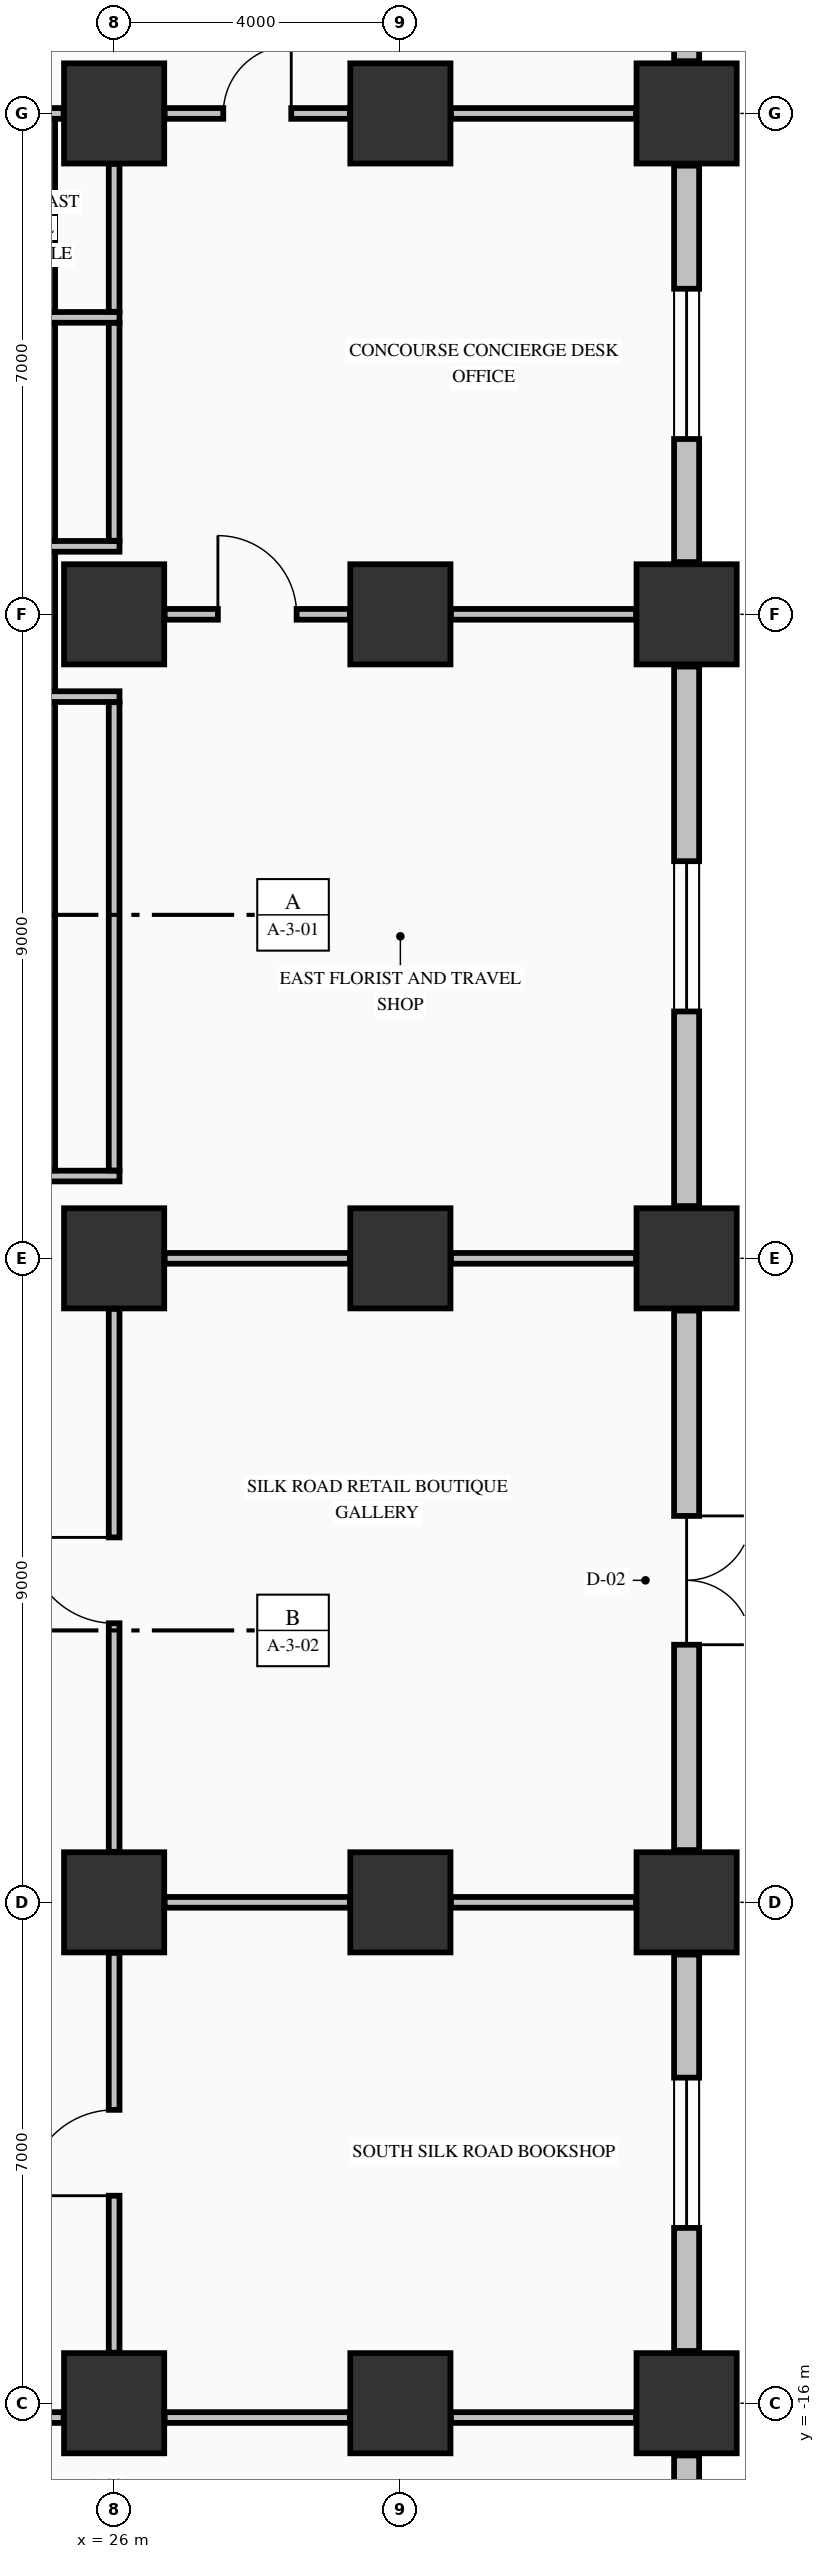
"""IFC4 building model, lengths in metres.
Left out: names, types, materials, properties, quantities, classifications, styles, units other than length and angle.
Written with IfcOpenShell. Run it as: python <this file> out.ifc"""

import sys

from ifc_helpers import new_model, si_unit, direction, frame, frame_2d, origin, origin_2d, place, context, subcontext, project, spatial, rectangle, extrude, element, fill, save


model = new_model("IFC4")
c1 = context("Model", 3, precision=1e-05, world=origin(), true_north=direction((0.0, 1.0)))
c2 = subcontext(c1, "Body", "Model", "MODEL_VIEW")
j1 = project(units=[si_unit("LENGTHUNIT", "METRE"), si_unit("PLANEANGLEUNIT", "RADIAN")], contexts=[c1])
p1 = place(None, origin())
s1 = spatial("IfcSite", under=j1, at=p1, CompositionType="ELEMENT")
p2 = place(p1, origin())
s2 = spatial("IfcBuilding", under=s1, at=p2, CompositionType="ELEMENT")
p3 = place(p2, origin())
s3 = spatial("IfcBuildingStorey", under=s2, at=p3, CompositionType="ELEMENT", Elevation=0.0)
for number, where, z_axis, x_axis in (
    (1, (26.0, -16.0, 0.0), (0.0, 0.0, 1.0), (1.0, 0.0, 0.0)),
    (2, (26.0, -9.0, 0.0), (0.0, 0.0, 1.0), (1.0, 0.0, 0.0)),
    (3, (26.0, 0.0, 0.0), (0.0, 0.0, 1.0), (1.0, 0.0, 0.0)),
    (4, (26.0, 9.0, 0.0), (0.0, 0.0, 1.0), (1.0, 0.0, 0.0)),
    (5, (26.0, 16.0, 0.0), (0.0, 0.0, 1.0), (1.0, 0.0, 0.0)),
    (6, (30.0, -16.0, 0.0), (0.0, 0.0, 1.0), (1.0, 0.0, 0.0)),
    (7, (30.0, -9.0, 0.0), (0.0, 0.0, 1.0), (1.0, 0.0, 0.0)),
    (8, (30.0, 0.0, 0.0), (0.0, 0.0, 1.0), (1.0, 0.0, 0.0)),
    (9, (30.0, 9.0, 0.0), (0.0, 0.0, 1.0), (1.0, 0.0, 0.0)),
    (10, (30.0, 16.0, 0.0), (0.0, 0.0, 1.0), (1.0, 0.0, 0.0)),
    (11, (34.0, -16.0, 0.0), (0.0, 0.0, 1.0), (1.0, 0.0, 0.0)),
    (12, (34.0, -9.0, 0.0), (0.0, 0.0, 1.0), (1.0, 0.0, 0.0)),
    (13, (34.0, 0.0, 0.0), (0.0, 0.0, 1.0), (1.0, 0.0, 0.0)),
    (14, (34.0, 9.0, 0.0), (0.0, 0.0, 1.0), (1.0, 0.0, 0.0)),
    (15, (34.0, 16.0, 0.0), (0.0, 0.0, 1.0), (1.0, 0.0, 0.0)),
):
    element("IfcColumn", number, at=place(p3, frame(where, z_axis=z_axis, x_axis=x_axis)), inside=s3, PredefinedType="COLUMN", context=c2, shape_type="SweptSolid", body=[
        extrude(rectangle(XDim=1.4, YDim=1.4, at=origin_2d()), origin(), (0.0, 0.0, 1.0), 5.09),
    ])
p4 = place(p3, frame((34.0, -16.73, 0.0), z_axis=(0.0, 0.0, 1.0), x_axis=(0.0, -1.0, 0.0)))
e16 = element("IfcWall", 16, at=p4, inside=s3, PredefinedType="STANDARD", context=c2, shape_type="SweptSolid", body=[
    extrude(rectangle(XDim=4.54, YDim=0.35, at=frame_2d((2.27, 0.0))), origin(), (0.0, 0.0, 1.0), 5.09),
])
p5 = place(p4, frame((2.47, 0.0, 0.0)))
e17 = element("IfcOpeningElement", 17, at=p5, cuts=e16, PredefinedType="OPENING", context=c2, shape_type="SweptSolid", body=[
    extrude(rectangle(XDim=1.2, YDim=2.2, at=frame_2d((0.6, 1.1))), frame((0.0, 0.185, 0.0), z_axis=(0.0, -1.0, 0.0), x_axis=(1.0, 0.0, 0.0)), (0.0, 0.0, 1.0), 0.37),
])
p6 = place(p3, frame((34.0, -9.73, 0.0), z_axis=(0.0, 0.0, 1.0), x_axis=(0.0, -1.0, 0.0)))
e18 = element("IfcWall", 18, at=p6, inside=s3, PredefinedType="STANDARD", context=c2, shape_type="SweptSolid", body=[
    extrude(rectangle(XDim=5.54, YDim=0.35, at=frame_2d((2.77, 0.0))), origin(), (0.0, 0.0, 1.0), 4.482),
])
p7 = place(p6, frame((1.72, 0.0, 0.75)))
e19 = element("IfcOpeningElement", 19, at=p7, cuts=e18, PredefinedType="OPENING", context=c2, shape_type="SweptSolid", body=[
    extrude(rectangle(XDim=2.1, YDim=1.75, at=frame_2d((1.05, 0.875))), frame((0.0, 0.185, 0.0), z_axis=(0.0, -1.0, 0.0), x_axis=(1.0, 0.0, 0.0)), (0.0, 0.0, 1.0), 0.37),
])
p8 = place(p3, frame((34.0, -0.73, 0.0), z_axis=(0.0, 0.0, 1.0), x_axis=(0.0, -1.0, 0.0)))
e20 = element("IfcWall", 20, at=p8, inside=s3, PredefinedType="STANDARD", context=c2, shape_type="SweptSolid", body=[
    extrude(rectangle(XDim=7.54, YDim=0.35, at=frame_2d((3.77, 0.0))), origin(), (0.0, 0.0, 1.0), 4.482),
])
p9 = place(p8, frame((2.87, 0.0, 0.0)))
e21 = element("IfcOpeningElement", 21, at=p9, cuts=e20, PredefinedType="OPENING", context=c2, shape_type="SweptSolid", body=[
    extrude(rectangle(XDim=1.8, YDim=2.4, at=frame_2d((0.9, 1.2))), frame((0.0, 0.185, 0.0), z_axis=(0.0, -1.0, 0.0), x_axis=(1.0, 0.0, 0.0)), (0.0, 0.0, 1.0), 0.37),
])
p10 = place(p3, frame((34.0, 8.27, 0.0), z_axis=(0.0, 0.0, 1.0), x_axis=(0.0, -1.0, 0.0)))
e22 = element("IfcWall", 22, at=p10, inside=s3, PredefinedType="STANDARD", context=c2, shape_type="SweptSolid", body=[
    extrude(rectangle(XDim=7.54, YDim=0.35, at=frame_2d((3.77, 0.0))), origin(), (0.0, 0.0, 1.0), 4.482),
])
p11 = place(p10, frame((2.72, 0.0, 0.75)))
e23 = element("IfcOpeningElement", 23, at=p11, cuts=e22, PredefinedType="OPENING", context=c2, shape_type="SweptSolid", body=[
    extrude(rectangle(XDim=2.1, YDim=1.75, at=frame_2d((1.05, 0.875))), frame((0.0, 0.185, 0.0), z_axis=(0.0, -1.0, 0.0), x_axis=(1.0, 0.0, 0.0)), (0.0, 0.0, 1.0), 0.37),
])
p12 = place(p3, frame((34.0, 15.27, 0.0), z_axis=(0.0, 0.0, 1.0), x_axis=(0.0, -1.0, 0.0)))
e24 = element("IfcWall", 24, at=p12, inside=s3, PredefinedType="STANDARD", context=c2, shape_type="SweptSolid", body=[
    extrude(rectangle(XDim=5.54, YDim=0.35, at=frame_2d((2.77, 0.0))), origin(), (0.0, 0.0, 1.0), 4.482),
])
p13 = place(p12, frame((1.72, 0.0, 0.75)))
e25 = element("IfcOpeningElement", 25, at=p13, cuts=e24, PredefinedType="OPENING", context=c2, shape_type="SweptSolid", body=[
    extrude(rectangle(XDim=2.1, YDim=1.75, at=frame_2d((1.05, 0.875))), frame((0.0, 0.185, 0.0), z_axis=(0.0, -1.0, 0.0), x_axis=(1.0, 0.0, 0.0)), (0.0, 0.0, 1.0), 0.37),
])
p14 = place(p3, frame((34.0, 21.27, 0.0), z_axis=(0.0, 0.0, 1.0), x_axis=(0.0, -1.0, 0.0)))
e26 = element("IfcWall", 26, at=p14, inside=s3, PredefinedType="STANDARD", context=c2, shape_type="SweptSolid", body=[
    extrude(rectangle(XDim=4.54, YDim=0.35, at=frame_2d((2.27, 0.0))), origin(), (0.0, 0.0, 1.0), 5.09),
])
p15 = place(p14, frame((0.87, 0.0, 0.0)))
e27 = element("IfcOpeningElement", 27, at=p15, cuts=e26, PredefinedType="OPENING", context=c2, shape_type="SweptSolid", body=[
    extrude(rectangle(XDim=1.2, YDim=2.2, at=frame_2d((0.6, 1.1))), frame((0.0, 0.185, 0.0), z_axis=(0.0, -1.0, 0.0), x_axis=(1.0, 0.0, 0.0)), (0.0, 0.0, 1.0), 0.37),
])
p16 = place(p3, frame((20.806, -16.2, 0.0), z_axis=(0.0, 0.0, 1.0), x_axis=(1.0, 0.0, 0.0)))
e28 = element("IfcWall", 28, at=p16, inside=s3, PredefinedType="PARTITIONING", context=c2, shape_type="SweptSolid", body=[
    extrude(rectangle(XDim=4.488, YDim=0.15, at=frame_2d((2.244, 0.0))), origin(), (0.0, 0.0, 1.0), 4.132),
])
p17 = place(p16, frame((0.15, 0.0, 0.0)))
e29 = element("IfcOpeningElement", 29, at=p17, cuts=e28, PredefinedType="OPENING", context=c2, shape_type="SweptSolid", body=[
    extrude(rectangle(XDim=1.1, YDim=2.15, at=frame_2d((0.55, 1.075))), frame((0.0, 0.085, 0.0), z_axis=(0.0, -1.0, 0.0), x_axis=(1.0, 0.0, 0.0)), (0.0, 0.0, 1.0), 0.17),
])
p18 = place(p16, frame((2.844, 0.0, 0.0)))
e30 = element("IfcOpeningElement", 30, at=p18, cuts=e28, PredefinedType="OPENING", context=c2, shape_type="SweptSolid", body=[
    extrude(rectangle(XDim=1.1, YDim=2.15, at=frame_2d((0.55, 1.075))), frame((0.0, 0.085, 0.0), z_axis=(0.0, -1.0, 0.0), x_axis=(1.0, 0.0, 0.0)), (0.0, 0.0, 1.0), 0.17),
])
for number, where, z_axis, x_axis in (
    (31, (26.706, -16.2, 0.0), (0.0, 0.0, 1.0), (1.0, 0.0, 0.0)),
    (32, (30.706, -16.2, 0.0), (0.0, 0.0, 1.0), (1.0, 0.0, 0.0)),
    (33, (26.706, -9.0, 0.0), (0.0, 0.0, 1.0), (1.0, 0.0, 0.0)),
    (34, (30.706, -9.0, 0.0), (0.0, 0.0, 1.0), (1.0, 0.0, 0.0)),
    (35, (26.706, 0.0, 0.0), (0.0, 0.0, 1.0), (1.0, 0.0, 0.0)),
    (36, (30.706, 0.0, 0.0), (0.0, 0.0, 1.0), (1.0, 0.0, 0.0)),
):
    element("IfcWall", number, at=place(p3, frame(where, z_axis=z_axis, x_axis=x_axis)), inside=s3, PredefinedType="PARTITIONING", context=c2, shape_type="SweptSolid", body=[
        extrude(rectangle(XDim=2.588, YDim=0.15, at=frame_2d((1.294, 0.0))), origin(), (0.0, 0.0, 1.0), 4.132),
    ])
for number, where, z_axis, x_axis in (
    (37, (22.325, 1.15, 0.0), (0.0, 0.0, 1.0), (1.0, 0.0, 0.0)),
    (38, (22.325, 7.85, 0.0), (0.0, 0.0, 1.0), (1.0, 0.0, 0.0)),
):
    element("IfcWall", number, at=place(p3, frame(where, z_axis=z_axis, x_axis=x_axis)), inside=s3, PredefinedType="PARTITIONING", context=c2, shape_type="SweptSolid", body=[
        extrude(rectangle(XDim=3.75, YDim=0.15, at=frame_2d((1.875, 0.0))), origin(), (0.0, 0.0, 1.0), 5.09),
    ])
p19 = place(p3, frame((26.706, 9.0, 0.0), z_axis=(0.0, 0.0, 1.0), x_axis=(1.0, 0.0, 0.0)))
e39 = element("IfcWall", 39, at=p19, inside=s3, PredefinedType="PARTITIONING", context=c2, shape_type="SweptSolid", body=[
    extrude(rectangle(XDim=2.588, YDim=0.15, at=frame_2d((1.294, 0.0))), origin(), (0.0, 0.0, 1.0), 4.132),
])
p20 = place(p19, frame((0.744, 0.0, 0.0)))
e40 = element("IfcOpeningElement", 40, at=p20, cuts=e39, PredefinedType="OPENING", context=c2, shape_type="SweptSolid", body=[
    extrude(rectangle(XDim=1.1, YDim=2.15, at=frame_2d((0.55, 1.075))), frame((0.0, 0.085, 0.0), z_axis=(0.0, -1.0, 0.0), x_axis=(1.0, 0.0, 0.0)), (0.0, 0.0, 1.0), 0.17),
])
p21 = place(p3, frame((30.706, 9.0, 0.0), z_axis=(0.0, 0.0, 1.0), x_axis=(1.0, 0.0, 0.0)))
e41 = element("IfcWall", 41, at=p21, inside=s3, PredefinedType="PARTITIONING", context=c2, shape_type="SweptSolid", body=[
    extrude(rectangle(XDim=2.588, YDim=0.15, at=frame_2d((1.294, 0.0))), origin(), (0.0, 0.0, 1.0), 4.132),
])
for number, where, z_axis, x_axis in (
    (42, (22.325, 9.95, 0.0), (0.0, 0.0, 1.0), (1.0, 0.0, 0.0)),
    (43, (22.325, 13.15, 0.0), (0.0, 0.0, 1.0), (1.0, 0.0, 0.0)),
):
    element("IfcWall", number, at=place(p3, frame(where, z_axis=z_axis, x_axis=x_axis)), inside=s3, PredefinedType="PARTITIONING", context=c2, shape_type="SweptSolid", body=[
        extrude(rectangle(XDim=3.75, YDim=0.15, at=frame_2d((1.875, 0.0))), origin(), (0.0, 0.0, 1.0), 5.09),
    ])
p22 = place(p3, frame((20.806, 16.0, 0.0), z_axis=(0.0, 0.0, 1.0), x_axis=(1.0, 0.0, 0.0)))
e44 = element("IfcWall", 44, at=p22, inside=s3, PredefinedType="PARTITIONING", context=c2, shape_type="SweptSolid", body=[
    extrude(rectangle(XDim=4.488, YDim=0.15, at=frame_2d((2.244, 0.0))), origin(), (0.0, 0.0, 1.0), 4.132),
])
p23 = place(p22, frame((0.15, 0.0, 0.0)))
e45 = element("IfcOpeningElement", 45, at=p23, cuts=e44, PredefinedType="OPENING", context=c2, shape_type="SweptSolid", body=[
    extrude(rectangle(XDim=1.1, YDim=2.15, at=frame_2d((0.55, 1.075))), frame((0.0, 0.085, 0.0), z_axis=(0.0, -1.0, 0.0), x_axis=(1.0, 0.0, 0.0)), (0.0, 0.0, 1.0), 0.17),
])
p24 = place(p3, frame((26.706, 16.0, 0.0), z_axis=(0.0, 0.0, 1.0), x_axis=(1.0, 0.0, 0.0)))
e46 = element("IfcWall", 46, at=p24, inside=s3, PredefinedType="PARTITIONING", context=c2, shape_type="SweptSolid", body=[
    extrude(rectangle(XDim=2.588, YDim=0.15, at=frame_2d((1.294, 0.0))), origin(), (0.0, 0.0, 1.0), 4.132),
])
p25 = place(p24, frame((0.819, 0.0, 0.0)))
e47 = element("IfcOpeningElement", 47, at=p25, cuts=e46, PredefinedType="OPENING", context=c2, shape_type="SweptSolid", body=[
    extrude(rectangle(XDim=0.95, YDim=2.15, at=frame_2d((0.475, 1.075))), frame((0.0, 0.085, 0.0), z_axis=(0.0, -1.0, 0.0), x_axis=(1.0, 0.0, 0.0)), (0.0, 0.0, 1.0), 0.17),
])
p26 = place(p3, frame((30.706, 16.0, 0.0), z_axis=(0.0, 0.0, 1.0), x_axis=(1.0, 0.0, 0.0)))
e48 = element("IfcWall", 48, at=p26, inside=s3, PredefinedType="PARTITIONING", context=c2, shape_type="SweptSolid", body=[
    extrude(rectangle(XDim=2.588, YDim=0.15, at=frame_2d((1.294, 0.0))), origin(), (0.0, 0.0, 1.0), 4.132),
])
p27 = place(p3, frame((25.1, 1.228, 0.0), z_axis=(0.0, 0.0, 1.0), x_axis=(0.0, 1.0, 0.0)))
e49 = element("IfcWall", 49, at=p27, inside=s3, PredefinedType="PARTITIONING", context=c2, shape_type="SweptSolid", body=[
    extrude(rectangle(XDim=6.544, YDim=0.15, at=frame_2d((3.272, 0.0))), origin(), (0.0, 0.0, 1.0), 5.09),
])
p28 = place(p3, frame((25.1, 7.928, 0.0), z_axis=(0.0, 0.0, 1.0), x_axis=(0.0, 1.0, 0.0)))
e50 = element("IfcWall", 50, at=p28, inside=s3, PredefinedType="PARTITIONING", context=c2, shape_type="SweptSolid", body=[
    extrude(rectangle(XDim=1.944, YDim=0.15, at=frame_2d((0.972, 0.0))), origin(), (0.0, 0.0, 1.0), 5.09),
])
p29 = place(p3, frame((25.1, 10.028, 0.0), z_axis=(0.0, 0.0, 1.0), x_axis=(0.0, 1.0, 0.0)))
e51 = element("IfcWall", 51, at=p29, inside=s3, PredefinedType="PARTITIONING", context=c2, shape_type="SweptSolid", body=[
    extrude(rectangle(XDim=3.044, YDim=0.15, at=frame_2d((1.522, 0.0))), origin(), (0.0, 0.0, 1.0), 5.09),
])
p30 = place(p3, frame((25.1, 13.228, 0.0), z_axis=(0.0, 0.0, 1.0), x_axis=(0.0, 1.0, 0.0)))
e52 = element("IfcWall", 52, at=p30, inside=s3, PredefinedType="PARTITIONING", context=c2, shape_type="SweptSolid", body=[
    extrude(rectangle(XDim=2.694, YDim=0.15, at=frame_2d((1.347, 0.0))), origin(), (0.0, 0.0, 1.0), 5.09),
])
p31 = place(p3, frame((26.0, -15.294, 0.0), z_axis=(0.0, 0.0, 1.0), x_axis=(0.0, 1.0, 0.0)))
e53 = element("IfcWall", 53, at=p31, inside=s3, PredefinedType="PARTITIONING", context=c2, shape_type="SweptSolid", body=[
    extrude(rectangle(XDim=5.588, YDim=0.15, at=frame_2d((2.794, 0.0))), origin(), (0.0, 0.0, 1.0), 4.132),
])
p32 = place(p31, frame((2.194, 0.0, 0.0)))
e54 = element("IfcOpeningElement", 54, at=p32, cuts=e53, PredefinedType="OPENING", context=c2, shape_type="SweptSolid", body=[
    extrude(rectangle(XDim=1.2, YDim=2.15, at=frame_2d((0.6, 1.075))), frame((0.0, 0.085, 0.0), z_axis=(0.0, -1.0, 0.0), x_axis=(1.0, 0.0, 0.0)), (0.0, 0.0, 1.0), 0.17),
])
p33 = place(p3, frame((26.0, -8.294, 0.0), z_axis=(0.0, 0.0, 1.0), x_axis=(0.0, 1.0, 0.0)))
e55 = element("IfcWall", 55, at=p33, inside=s3, PredefinedType="PARTITIONING", context=c2, shape_type="SweptSolid", body=[
    extrude(rectangle(XDim=7.588, YDim=0.15, at=frame_2d((3.794, 0.0))), origin(), (0.0, 0.0, 1.0), 4.132),
])
p34 = place(p33, frame((3.194, 0.0, 0.0)))
e56 = element("IfcOpeningElement", 56, at=p34, cuts=e55, PredefinedType="OPENING", context=c2, shape_type="SweptSolid", body=[
    extrude(rectangle(XDim=1.2, YDim=2.15, at=frame_2d((0.6, 1.075))), frame((0.0, 0.085, 0.0), z_axis=(0.0, -1.0, 0.0), x_axis=(1.0, 0.0, 0.0)), (0.0, 0.0, 1.0), 0.17),
])
p35 = place(p3, frame((26.0, 1.228, 0.0), z_axis=(0.0, 0.0, 1.0), x_axis=(0.0, 1.0, 0.0)))
e57 = element("IfcWall", 57, at=p35, inside=s3, PredefinedType="PARTITIONING", context=c2, shape_type="SweptSolid", body=[
    extrude(rectangle(XDim=6.544, YDim=0.15, at=frame_2d((3.272, 0.0))), origin(), (0.0, 0.0, 1.0), 4.132),
])
p36 = place(p3, frame((26.0, 10.028, 0.0), z_axis=(0.0, 0.0, 1.0), x_axis=(0.0, 1.0, 0.0)))
e58 = element("IfcWall", 58, at=p36, inside=s3, PredefinedType="PARTITIONING", context=c2, shape_type="SweptSolid", body=[
    extrude(rectangle(XDim=3.044, YDim=0.15, at=frame_2d((1.522, 0.0))), origin(), (0.0, 0.0, 1.0), 4.132),
])
p37 = place(p3, frame((26.0, 13.228, 0.0), z_axis=(0.0, 0.0, 1.0), x_axis=(0.0, 1.0, 0.0)))
e59 = element("IfcWall", 59, at=p37, inside=s3, PredefinedType="PARTITIONING", context=c2, shape_type="SweptSolid", body=[
    extrude(rectangle(XDim=2.066, YDim=0.15, at=frame_2d((1.033, 0.0))), origin(), (0.0, 0.0, 1.0), 4.132),
])
p38 = place(p7, origin())
e60 = element("IfcWindow", 60, at=p38, inside=s3, PartitioningType="SINGLE_PANEL", PredefinedType="WINDOW", context=c2, shape_type="SweptSolid", body=[
    extrude(rectangle(XDim=2.1, YDim=1.75, at=frame_2d((1.05, 0.875))), frame((0.0, 0.03, 0.0), z_axis=(0.0, -1.0, 0.0), x_axis=(1.0, 0.0, 0.0)), (0.0, 0.0, 1.0), 0.06),
])
fill(e19, e60)
p39 = place(p9, origin())
e61 = element("IfcDoor", 61, at=p39, inside=s3, OperationType="DOUBLE_DOOR_SINGLE_SWING", PredefinedType="DOOR", context=c2, shape_type="SweptSolid", body=[
    extrude(rectangle(XDim=1.8, YDim=2.4, at=frame_2d((0.9, 1.2))), frame((0.0, 0.025, 0.0), z_axis=(0.0, -1.0, 0.0), x_axis=(1.0, 0.0, 0.0)), (0.0, 0.0, 1.0), 0.05),
])
fill(e21, e61)
p40 = place(p11, origin())
e62 = element("IfcWindow", 62, at=p40, inside=s3, PartitioningType="SINGLE_PANEL", PredefinedType="WINDOW", context=c2, shape_type="SweptSolid", body=[
    extrude(rectangle(XDim=2.1, YDim=1.75, at=frame_2d((1.05, 0.875))), frame((0.0, 0.03, 0.0), z_axis=(0.0, -1.0, 0.0), x_axis=(1.0, 0.0, 0.0)), (0.0, 0.0, 1.0), 0.06),
])
fill(e23, e62)
p41 = place(p13, origin())
e63 = element("IfcWindow", 63, at=p41, inside=s3, PartitioningType="SINGLE_PANEL", PredefinedType="WINDOW", context=c2, shape_type="SweptSolid", body=[
    extrude(rectangle(XDim=2.1, YDim=1.75, at=frame_2d((1.05, 0.875))), frame((0.0, 0.03, 0.0), z_axis=(0.0, -1.0, 0.0), x_axis=(1.0, 0.0, 0.0)), (0.0, 0.0, 1.0), 0.06),
])
fill(e25, e63)
p42 = place(p32, origin())
e64 = element("IfcDoor", 64, at=p42, inside=s3, OperationType="SINGLE_SWING_LEFT", PredefinedType="DOOR", context=c2, shape_type="SweptSolid", body=[
    extrude(rectangle(XDim=1.2, YDim=2.15, at=frame_2d((0.6, 1.075))), frame((0.0, 0.025, 0.0), z_axis=(0.0, -1.0, 0.0), x_axis=(1.0, 0.0, 0.0)), (0.0, 0.0, 1.0), 0.05),
])
fill(e54, e64)
p43 = place(p34, origin())
e65 = element("IfcDoor", 65, at=p43, inside=s3, OperationType="SINGLE_SWING_RIGHT", PredefinedType="DOOR", context=c2, shape_type="SweptSolid", body=[
    extrude(rectangle(XDim=1.2, YDim=2.15, at=frame_2d((0.6, 1.075))), frame((0.0, 0.025, 0.0), z_axis=(0.0, -1.0, 0.0), x_axis=(1.0, 0.0, 0.0)), (0.0, 0.0, 1.0), 0.05),
])
fill(e56, e65)
p44 = place(p20, origin())
e66 = element("IfcDoor", 66, at=p44, inside=s3, OperationType="SINGLE_SWING_LEFT", PredefinedType="DOOR", context=c2, shape_type="SweptSolid", body=[
    extrude(rectangle(XDim=1.1, YDim=2.15, at=frame_2d((0.55, 1.075))), frame((0.0, 0.025, 0.0), z_axis=(0.0, -1.0, 0.0), x_axis=(1.0, 0.0, 0.0)), (0.0, 0.0, 1.0), 0.05),
])
fill(e40, e66)
p45 = place(p25, origin())
e67 = element("IfcDoor", 67, at=p45, inside=s3, OperationType="SINGLE_SWING_RIGHT", PredefinedType="DOOR", context=c2, shape_type="SweptSolid", body=[
    extrude(rectangle(XDim=0.95, YDim=2.15, at=frame_2d((0.475, 1.075))), frame((0.0, 0.025, 0.0), z_axis=(0.0, -1.0, 0.0), x_axis=(1.0, 0.0, 0.0)), (0.0, 0.0, 1.0), 0.05),
])
fill(e47, e67)
save(model, sys.argv[1])
